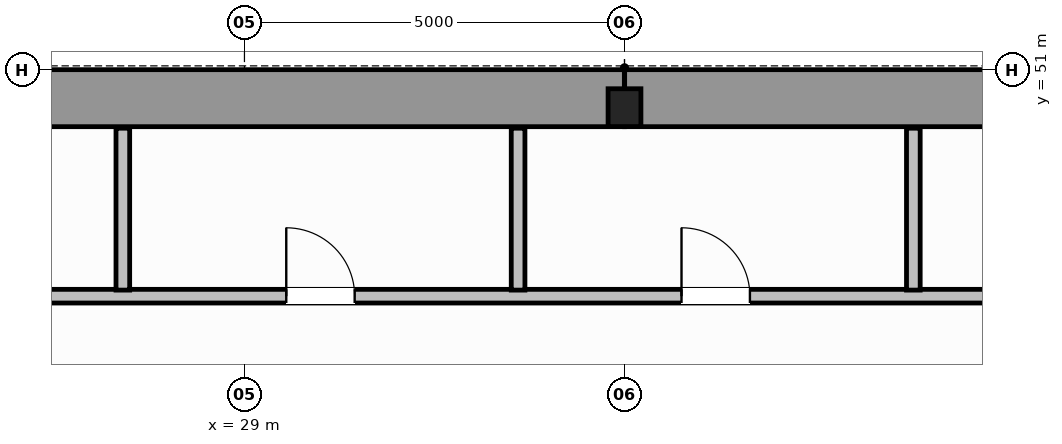
"""IFC4 building model, lengths in metres.
Left out: names, types, materials, properties, quantities, classifications, styles, units other than length and angle.
Written with IfcOpenShell. Run it as: python <this file> out.ifc"""

import sys

from ifc_helpers import new_model, si_unit, direction, frame, frame_2d, origin, origin_2d, place, context, subcontext, project, spatial, rectangle, i_section, extrude, source, transform, mapped, element, fill, save


model = new_model("IFC4")
c1 = context("Model", 3, precision=1e-05, world=origin(), true_north=direction((0.0, 1.0)))
c2 = subcontext(c1, "Body", "Model", "MODEL_VIEW")
j1 = project(units=[si_unit("LENGTHUNIT", "METRE"), si_unit("PLANEANGLEUNIT", "RADIAN")], contexts=[c1])
p1 = place(None, origin())
s1 = spatial("IfcSite", under=j1, at=p1, CompositionType="ELEMENT")
p2 = place(p1, origin())
s2 = spatial("IfcBuilding", under=s1, at=p2, CompositionType="ELEMENT")
p3 = place(p2, frame((0.0, 0.0, 157.6)))
s3 = spatial("IfcBuildingStorey", under=s2, at=p3, CompositionType="ELEMENT", Elevation=157.6)
m1 = source(origin(), c2, "Body", "SweptSolid", [
    extrude(i_section(OverallWidth=0.432, OverallDepth=0.498, WebThickness=0.055, FlangeThickness=0.068, FilletRadius=0.015, at=origin_2d()), origin(), (0.0, 0.0, 1.0), 3.8),
])
p4 = place(p3, frame((34.0, 50.5, 0.0), z_axis=(0.0, 0.0, 1.0), x_axis=(1.0, 0.0, 0.0)))
e1 = element("IfcColumn", 1, at=p4, inside=s3, PredefinedType="COLUMN", context=c2, shape_type="MappedRepresentation", body=[
    mapped(m1, transform((0.0, 0.0, 0.0), scale=1.0)),
])
for number, where, z_axis, x_axis in (
    (2, (14.379, 50.625, 0.0), (0.0, 0.0, 1.0), (1.0, 0.0, 0.0)),
    (3, (34.002, 50.625, 0.0), (0.0, 0.0, 1.0), (1.0, 0.0, 0.0)),
):
    element("IfcWall", number, at=place(p3, frame(where, z_axis=z_axis, x_axis=x_axis)), inside=s3, PredefinedType="SHEAR", context=c2, shape_type="SweptSolid", body=[
        extrude(rectangle(XDim=19.619, YDim=0.75, at=frame_2d((9.81, 0.0))), origin(), (0.0, 0.0, 1.0), 3.8),
    ])
p5 = place(p3, frame((18.62, 48.02, 0.0), z_axis=(0.0, 0.0, 1.0), x_axis=(1.0, 0.0, 0.0)))
e4 = element("IfcWall", 4, at=p5, inside=s3, PredefinedType="PLUMBINGWALL", context=c2, shape_type="SweptSolid", body=[
    extrude(rectangle(XDim=30.76, YDim=0.18, at=frame_2d((15.38, 0.0))), origin(), (0.0, 0.0, 1.0), 3.58),
])
p6 = place(p5, frame((1.655, 0.0, 0.0)))
e5 = element("IfcOpeningElement", 5, at=p6, cuts=e4, PredefinedType="OPENING", context=c2, shape_type="SweptSolid", body=[
    extrude(rectangle(XDim=0.9, YDim=2.15, at=frame_2d((0.45, 1.075))), frame((0.0, 0.1, 0.0), z_axis=(0.0, -1.0, 0.0), x_axis=(1.0, 0.0, 0.0)), (0.0, 0.0, 1.0), 0.2),
])
p7 = place(p5, frame((6.03, 0.0, 0.0)))
e6 = element("IfcOpeningElement", 6, at=p7, cuts=e4, PredefinedType="OPENING", context=c2, shape_type="SweptSolid", body=[
    extrude(rectangle(XDim=0.9, YDim=2.15, at=frame_2d((0.45, 1.075))), frame((0.0, 0.1, 0.0), z_axis=(0.0, -1.0, 0.0), x_axis=(1.0, 0.0, 0.0)), (0.0, 0.0, 1.0), 0.2),
])
p8 = place(p5, frame((10.93, 0.0, 0.0)))
e7 = element("IfcOpeningElement", 7, at=p8, cuts=e4, PredefinedType="OPENING", context=c2, shape_type="SweptSolid", body=[
    extrude(rectangle(XDim=0.9, YDim=2.15, at=frame_2d((0.45, 1.075))), frame((0.0, 0.1, 0.0), z_axis=(0.0, -1.0, 0.0), x_axis=(1.0, 0.0, 0.0)), (0.0, 0.0, 1.0), 0.2),
])
p9 = place(p5, frame((16.13, 0.0, 0.0)))
e8 = element("IfcOpeningElement", 8, at=p9, cuts=e4, PredefinedType="OPENING", context=c2, shape_type="SweptSolid", body=[
    extrude(rectangle(XDim=0.9, YDim=2.15, at=frame_2d((0.45, 1.075))), frame((0.0, 0.1, 0.0), z_axis=(0.0, -1.0, 0.0), x_axis=(1.0, 0.0, 0.0)), (0.0, 0.0, 1.0), 0.2),
])
p10 = place(p5, frame((21.73, 0.0, 0.0)))
e9 = element("IfcOpeningElement", 9, at=p10, cuts=e4, PredefinedType="OPENING", context=c2, shape_type="SweptSolid", body=[
    extrude(rectangle(XDim=0.9, YDim=2.15, at=frame_2d((0.45, 1.075))), frame((0.0, 0.1, 0.0), z_axis=(0.0, -1.0, 0.0), x_axis=(1.0, 0.0, 0.0)), (0.0, 0.0, 1.0), 0.2),
])
p11 = place(p5, frame((27.505, 0.0, 0.0)))
e10 = element("IfcOpeningElement", 10, at=p11, cuts=e4, PredefinedType="OPENING", context=c2, shape_type="SweptSolid", body=[
    extrude(rectangle(XDim=0.9, YDim=2.15, at=frame_2d((0.45, 1.075))), frame((0.0, 0.1, 0.0), z_axis=(0.0, -1.0, 0.0), x_axis=(1.0, 0.0, 0.0)), (0.0, 0.0, 1.0), 0.2),
])
for number, where, z_axis, x_axis in (
    (11, (27.4, 48.1, 0.0), (0.0, 0.0, 1.0), (0.0, 1.0, 0.0)),
    (12, (32.6, 48.1, 0.0), (0.0, 0.0, 1.0), (0.0, 1.0, 0.0)),
    (13, (37.8, 48.1, 0.0), (0.0, 0.0, 1.0), (0.0, 1.0, 0.0)),
):
    element("IfcWall", number, at=place(p3, frame(where, z_axis=z_axis, x_axis=x_axis)), inside=s3, PredefinedType="PLUMBINGWALL", context=c2, shape_type="SweptSolid", body=[
        extrude(rectangle(XDim=2.13, YDim=0.18, at=frame_2d((1.065, 0.0))), origin(), (0.0, 0.0, 1.0), 3.58),
    ])
m2 = source(origin(), c2, "Body", "SweptSolid", [
    extrude(rectangle(XDim=0.9, YDim=2.15, at=frame_2d((0.45, 1.075))), frame((0.0, 0.025, 0.0), z_axis=(0.0, -1.0, 0.0), x_axis=(1.0, 0.0, 0.0)), (0.0, 0.0, 1.0), 0.05),
])
p12 = place(p8, origin())
e14 = element("IfcDoor", 14, at=p12, inside=s3, OperationType="SINGLE_SWING_LEFT", PredefinedType="DOOR", context=c2, shape_type="MappedRepresentation", body=[
    mapped(m2, transform((0.0, 0.0, 0.0), scale=1.0)),
])
fill(e7, e14)
p13 = place(p9, origin())
e15 = element("IfcDoor", 15, at=p13, inside=s3, OperationType="SINGLE_SWING_RIGHT", PredefinedType="DOOR", context=c2, shape_type="MappedRepresentation", body=[
    mapped(m2, transform((0.0, 0.0, 0.0), scale=1.0)),
])
fill(e8, e15)
save(model, sys.argv[1])
